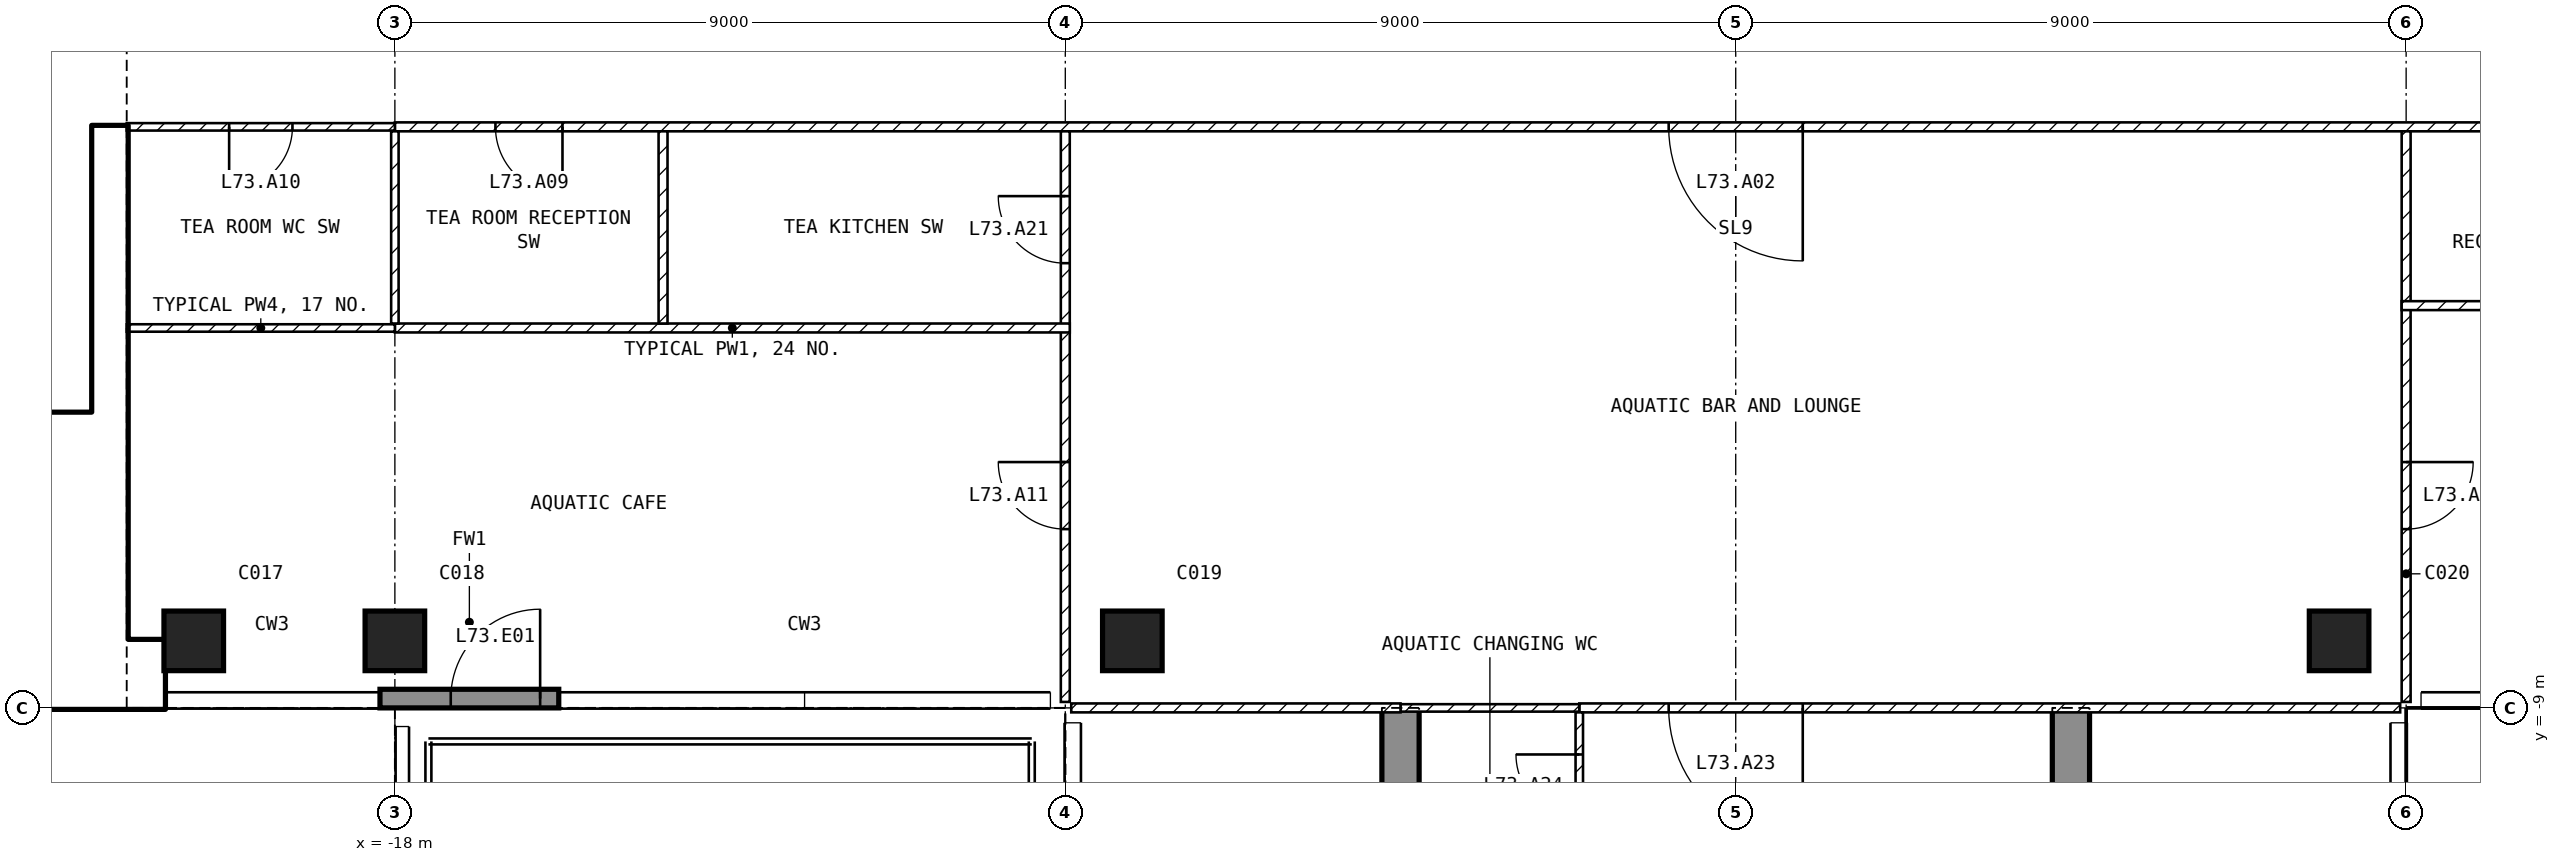
"""IFC4 building model, lengths in metres.
Left out: names, types, materials, properties, quantities, classifications, styles, units other than length and angle.
Written with IfcOpenShell. Run it as: python <this file> out.ifc"""

import sys

from ifc_helpers import new_model, si_unit, direction, frame, frame_2d, origin, origin_2d, place, context, subcontext, project, spatial, polyline, rectangle, outline, extrude, element, fill, save


model = new_model("IFC4")
c1 = context("Model", 3, precision=1e-05, world=origin(), true_north=direction((0.0, 1.0)))
c2 = subcontext(c1, "Body", "Model", "MODEL_VIEW")
j1 = project(units=[si_unit("LENGTHUNIT", "METRE"), si_unit("PLANEANGLEUNIT", "RADIAN")], contexts=[c1])
p1 = place(None, origin())
s1 = spatial("IfcSite", under=j1, at=p1, CompositionType="ELEMENT")
p2 = place(p1, origin())
s2 = spatial("IfcBuilding", under=s1, at=p2, CompositionType="ELEMENT")
p3 = place(p2, frame((0.0, 0.0, 285.0)))
s3 = spatial("IfcBuildingStorey", under=s2, at=p3, CompositionType="ELEMENT", Elevation=285.0)
for number, where, z_axis, x_axis in (
    (1, (-20.7, -8.1, -0.3), (0.0, 0.0, 1.0), (1.0, 0.0, 0.0)),
    (2, (-18.0, -8.1, -0.3), (0.0, 0.0, 1.0), (1.0, 0.0, 0.0)),
    (3, (-8.1, -8.1, -0.3), (0.0, 0.0, 1.0), (1.0, 0.0, 0.0)),
    (4, (8.1, -8.1, -0.3), (0.0, 0.0, 1.0), (1.0, 0.0, 0.0)),
):
    element("IfcColumn", number, at=place(p3, frame(where, z_axis=z_axis, x_axis=x_axis)), inside=s3, PredefinedType="COLUMN", context=c2, shape_type="SweptSolid", body=[
        extrude(rectangle(XDim=0.8, YDim=0.8, at=origin_2d()), origin(), (0.0, 0.0, 1.0), 5.45),
    ])
for number, where, z_axis, x_axis in (
    (5, (-4.75, -16.2, -0.3), (1.0, 0.0, 0.0), (0.0, 1.0, 0.0)),
    (6, (4.25, -16.2, -0.3), (1.0, 0.0, 0.0), (0.0, 1.0, 0.0)),
):
    element("IfcWall", number, at=place(p3, frame(where, z_axis=z_axis, x_axis=x_axis)), inside=s3, PredefinedType="SHEAR", context=c2, shape_type="SweptSolid", body=[
        extrude(outline(polyline([(0.0, 0.0), (2.7, 0.0), (2.7, 2.7), (5.1, 2.7), (5.1, 0.0), (7.2, 0.0), (7.2, 5.45), (0.0, 5.45), (0.0, 0.0)])), origin(), (0.0, 0.0, 1.0), 0.5),
    ])
p4 = place(p3, frame((-18.2, -8.875, 0.0), z_axis=(0.0, 0.0, 1.0), x_axis=(1.0, 0.0, 0.0)))
e7 = element("IfcWall", 7, at=p4, inside=s3, PredefinedType="SOLIDWALL", context=c2, shape_type="SweptSolid", body=[
    extrude(rectangle(XDim=2.4, YDim=0.25, at=frame_2d((1.2, 0.0))), origin(), (0.0, 0.0, 1.0), 5.15),
])
p5 = place(p4, frame((0.95, 0.0, 0.0)))
e8 = element("IfcOpeningElement", 8, at=p5, cuts=e7, PredefinedType="OPENING", context=c2, shape_type="SweptSolid", body=[
    extrude(rectangle(XDim=1.2, YDim=2.4, at=frame_2d((0.6, 1.2))), frame((0.0, 0.135, 0.0), z_axis=(0.0, -1.0, 0.0), x_axis=(1.0, 0.0, 0.0)), (0.0, 0.0, 1.0), 0.27),
])
p6 = place(p3, frame((-30.2, -8.55, 0.0), z_axis=(0.0, 0.0, 1.0), x_axis=(1.0, 0.0, 0.0)))
e9 = element("IfcWall", 9, at=p6, inside=s3, PredefinedType="SHEAR", context=c2, shape_type="SweptSolid", body=[
    extrude(rectangle(XDim=9.1, YDim=0.9, at=frame_2d((4.55, 0.0))), origin(), (0.0, 0.0, 1.0), 5.15),
])
p7 = place(p3, frame((-21.825, -8.1, 0.0), z_axis=(0.0, 0.0, 1.0), x_axis=(0.0, 1.0, 0.0)))
e10 = element("IfcWall", 10, at=p7, inside=s3, PredefinedType="SHEAR", context=c2, shape_type="SweptSolid", body=[
    extrude(rectangle(XDim=6.9, YDim=0.45, at=frame_2d((3.45, 0.0))), origin(), (0.0, 0.0, 1.0), 5.15),
])
p8 = place(p3, frame((-28.35, -5.15, 0.0), z_axis=(0.0, 0.0, 1.0), x_axis=(1.0, 0.0, 0.0)))
e11 = element("IfcWall", 11, at=p8, inside=s3, PredefinedType="SOLIDWALL", context=c2, shape_type="SweptSolid", body=[
    extrude(rectangle(XDim=6.3, YDim=0.2, at=frame_2d((3.15, 0.0))), origin(), (0.0, 0.0, 1.0), 5.15),
])
p9 = place(p8, frame((5.1, 0.0, 0.0)))
e12 = element("IfcOpeningElement", 12, at=p9, cuts=e11, PredefinedType="OPENING", context=c2, shape_type="SweptSolid", body=[
    extrude(rectangle(XDim=1.0, YDim=2.1, at=frame_2d((0.5, 1.05))), frame((0.0, 0.11, 0.0), z_axis=(0.0, -1.0, 0.0), x_axis=(1.0, 0.0, 0.0)), (0.0, 0.0, 1.0), 0.22),
])
p10 = place(p3, frame((14.4, -1.2, 0.0), z_axis=(0.0, 0.0, 1.0), x_axis=(-1.0, 0.0, 0.0)))
e13 = element("IfcWall", 13, at=p10, inside=s3, PredefinedType="PARTITIONING", context=c2, shape_type="SweptSolid", body=[
    extrude(rectangle(XDim=32.4, YDim=0.12, at=frame_2d((16.2, 0.0))), origin(), (0.0, 0.0, 1.0), 5.15),
])
p11 = place(p10, frame((13.5, 0.0, 0.0)))
e14 = element("IfcOpeningElement", 14, at=p11, cuts=e13, PredefinedType="OPENING", context=c2, shape_type="SweptSolid", body=[
    extrude(rectangle(XDim=1.8, YDim=2.1, at=frame_2d((0.9, 1.05))), frame((0.0, 0.07, 0.0), z_axis=(0.0, -1.0, 0.0), x_axis=(1.0, 0.0, 0.0)), (0.0, 0.0, 1.0), 0.14),
])
p12 = place(p10, frame((3.45, 0.0, 0.0)))
e15 = element("IfcOpeningElement", 15, at=p12, cuts=e13, PredefinedType="OPENING", context=c2, shape_type="SweptSolid", body=[
    extrude(rectangle(XDim=0.9, YDim=2.1, at=frame_2d((0.45, 1.05))), frame((0.0, 0.07, 0.0), z_axis=(0.0, -1.0, 0.0), x_axis=(1.0, 0.0, 0.0)), (0.0, 0.0, 1.0), 0.14),
])
p13 = place(p10, frame((30.15, 0.0, 0.0)))
e16 = element("IfcOpeningElement", 16, at=p13, cuts=e13, PredefinedType="OPENING", context=c2, shape_type="SweptSolid", body=[
    extrude(rectangle(XDim=0.9, YDim=2.1, at=frame_2d((0.45, 1.05))), frame((0.0, 0.07, 0.0), z_axis=(0.0, -1.0, 0.0), x_axis=(1.0, 0.0, 0.0)), (0.0, 0.0, 1.0), 0.14),
])
p14 = place(p3, frame((-18.0, -1.2, 0.0), z_axis=(0.0, 0.0, 1.0), x_axis=(-1.0, 0.0, 0.0)))
e17 = element("IfcWall", 17, at=p14, inside=s3, PredefinedType="PARTITIONING", context=c2, shape_type="SweptSolid", body=[
    extrude(rectangle(XDim=3.6, YDim=0.1, at=frame_2d((1.8, 0.0))), origin(), (0.0, 0.0, 1.0), 5.15),
])
p15 = place(p14, frame((1.375, 0.0, 0.0)))
e18 = element("IfcOpeningElement", 18, at=p15, cuts=e17, PredefinedType="OPENING", context=c2, shape_type="SweptSolid", body=[
    extrude(rectangle(XDim=0.85, YDim=2.1, at=frame_2d((0.425, 1.05))), frame((0.0, 0.06, 0.0), z_axis=(0.0, -1.0, 0.0), x_axis=(1.0, 0.0, 0.0)), (0.0, 0.0, 1.0), 0.12),
])
p16 = place(p3, frame((9.0, -1.26, 0.0), z_axis=(0.0, 0.0, 1.0), x_axis=(0.0, -1.0, 0.0)))
e19 = element("IfcWall", 19, at=p16, inside=s3, PredefinedType="PARTITIONING", context=c2, shape_type="SweptSolid", body=[
    extrude(rectangle(XDim=7.66, YDim=0.12, at=frame_2d((3.83, 0.0))), origin(), (0.0, 0.0, 1.0), 5.15),
])
p17 = place(p16, frame((4.44, 0.0, 0.0)))
e20 = element("IfcOpeningElement", 20, at=p17, cuts=e19, PredefinedType="OPENING", context=c2, shape_type="SweptSolid", body=[
    extrude(rectangle(XDim=0.9, YDim=2.1, at=frame_2d((0.45, 1.05))), frame((0.0, 0.07, 0.0), z_axis=(0.0, -1.0, 0.0), x_axis=(1.0, 0.0, 0.0)), (0.0, 0.0, 1.0), 0.14),
])
p18 = place(p3, frame((-9.0, -8.92, 0.0), z_axis=(0.0, 0.0, 1.0), x_axis=(0.0, 1.0, 0.0)))
e21 = element("IfcWall", 21, at=p18, inside=s3, PredefinedType="PARTITIONING", context=c2, shape_type="SweptSolid", body=[
    extrude(rectangle(XDim=7.66, YDim=0.12, at=frame_2d((3.83, 0.0))), origin(), (0.0, 0.0, 1.0), 5.15),
])
p19 = place(p18, frame((2.32, 0.0, 0.0)))
e22 = element("IfcOpeningElement", 22, at=p19, cuts=e21, PredefinedType="OPENING", context=c2, shape_type="SweptSolid", body=[
    extrude(rectangle(XDim=0.9, YDim=2.1, at=frame_2d((0.45, 1.05))), frame((0.0, 0.07, 0.0), z_axis=(0.0, -1.0, 0.0), x_axis=(1.0, 0.0, 0.0)), (0.0, 0.0, 1.0), 0.14),
])
p20 = place(p18, frame((5.89, 0.0, 0.0)))
e23 = element("IfcOpeningElement", 23, at=p20, cuts=e21, PredefinedType="OPENING", context=c2, shape_type="SweptSolid", body=[
    extrude(rectangle(XDim=0.9, YDim=2.1, at=frame_2d((0.45, 1.05))), frame((0.0, 0.07, 0.0), z_axis=(0.0, -1.0, 0.0), x_axis=(1.0, 0.0, 0.0)), (0.0, 0.0, 1.0), 0.14),
])
p21 = place(p3, frame((8.92, -9.0, 0.0), z_axis=(0.0, 0.0, 1.0), x_axis=(-1.0, 0.0, 0.0)))
e24 = element("IfcWall", 24, at=p21, inside=s3, PredefinedType="PARTITIONING", context=c2, shape_type="SweptSolid", body=[
    extrude(rectangle(XDim=11.02, YDim=0.12, at=frame_2d((5.51, 0.0))), origin(), (0.0, 0.0, 1.0), 5.15),
])
p22 = place(p21, frame((8.02, 0.0, 0.0)))
e25 = element("IfcOpeningElement", 25, at=p22, cuts=e24, PredefinedType="OPENING", context=c2, shape_type="SweptSolid", body=[
    extrude(rectangle(XDim=1.8, YDim=2.1, at=frame_2d((0.9, 1.05))), frame((0.0, 0.07, 0.0), z_axis=(0.0, -1.0, 0.0), x_axis=(1.0, 0.0, 0.0)), (0.0, 0.0, 1.0), 0.14),
])
p23 = place(p3, frame((-2.1, -9.0, 0.0), z_axis=(0.0, 0.0, 1.0), x_axis=(-1.0, 0.0, 0.0)))
e26 = element("IfcWall", 26, at=p23, inside=s3, PredefinedType="PARTITIONING", context=c2, shape_type="SweptSolid", body=[
    extrude(rectangle(XDim=2.4, YDim=0.1, at=frame_2d((1.2, 0.0))), origin(), (0.0, 0.0, 1.0), 5.15),
])
p24 = place(p3, frame((-4.5, -9.0, 0.0), z_axis=(0.0, 0.0, 1.0), x_axis=(-1.0, 0.0, 0.0)))
e27 = element("IfcWall", 27, at=p24, inside=s3, PredefinedType="PARTITIONING", context=c2, shape_type="SweptSolid", body=[
    extrude(rectangle(XDim=4.42, YDim=0.12, at=frame_2d((2.21, 0.0))), origin(), (0.0, 0.0, 1.0), 5.15),
])
p25 = place(p3, frame((8.94, -3.6, 0.0), z_axis=(0.0, 0.0, 1.0), x_axis=(1.0, 0.0, 0.0)))
e28 = element("IfcWall", 28, at=p25, inside=s3, PredefinedType="PARTITIONING", context=c2, shape_type="SweptSolid", body=[
    extrude(rectangle(XDim=5.46, YDim=0.12, at=frame_2d((2.73, 0.0))), origin(), (0.0, 0.0, 1.0), 5.15),
])
p26 = place(p3, frame((-18.0, -3.9, 0.0), z_axis=(0.0, 0.0, 1.0), x_axis=(1.0, 0.0, 0.0)))
e29 = element("IfcWall", 29, at=p26, inside=s3, PredefinedType="PARTITIONING", context=c2, shape_type="SweptSolid", body=[
    extrude(rectangle(XDim=9.06, YDim=0.12, at=frame_2d((4.53, 0.0))), origin(), (0.0, 0.0, 1.0), 5.15),
])
p27 = place(p3, frame((-21.6, -3.9, 0.0), z_axis=(0.0, 0.0, 1.0), x_axis=(1.0, 0.0, 0.0)))
e30 = element("IfcWall", 30, at=p27, inside=s3, PredefinedType="PARTITIONING", context=c2, shape_type="SweptSolid", body=[
    extrude(rectangle(XDim=3.6, YDim=0.1, at=frame_2d((1.8, 0.0))), origin(), (0.0, 0.0, 1.0), 5.15),
])
p28 = place(p3, frame((-14.4, -3.84, 0.0), z_axis=(0.0, 0.0, 1.0), x_axis=(0.0, 1.0, 0.0)))
e31 = element("IfcWall", 31, at=p28, inside=s3, PredefinedType="PARTITIONING", context=c2, shape_type="SweptSolid", body=[
    extrude(rectangle(XDim=2.58, YDim=0.12, at=frame_2d((1.29, 0.0))), origin(), (0.0, 0.0, 1.0), 5.15),
])
p29 = place(p3, frame((-18.0, -3.84, 0.0), z_axis=(0.0, 0.0, 1.0), x_axis=(0.0, 1.0, 0.0)))
e32 = element("IfcWall", 32, at=p29, inside=s3, PredefinedType="PARTITIONING", context=c2, shape_type="SweptSolid", body=[
    extrude(rectangle(XDim=2.58, YDim=0.1, at=frame_2d((1.29, 0.0))), origin(), (0.0, 0.0, 1.0), 4.396),
])
p30 = place(p3, frame((-2.1, -11.04, 0.0), z_axis=(0.0, 0.0, 1.0), x_axis=(0.0, 1.0, 0.0)))
e33 = element("IfcWall", 33, at=p30, inside=s3, PredefinedType="PARTITIONING", context=c2, shape_type="SweptSolid", body=[
    extrude(rectangle(XDim=1.98, YDim=0.1, at=frame_2d((0.99, 0.0))), origin(), (0.0, 0.0, 1.0), 5.15),
])
p31 = place(p30, frame((0.565, 0.0, 0.0)))
e34 = element("IfcOpeningElement", 34, at=p31, cuts=e33, PredefinedType="OPENING", context=c2, shape_type="SweptSolid", body=[
    extrude(rectangle(XDim=0.85, YDim=2.1, at=frame_2d((0.425, 1.05))), frame((0.0, 0.06, 0.0), z_axis=(0.0, -1.0, 0.0), x_axis=(1.0, 0.0, 0.0)), (0.0, 0.0, 1.0), 0.12),
])
p32 = place(p5, origin())
e35 = element("IfcDoor", 35, at=p32, inside=s3, OperationType="SINGLE_SWING_RIGHT", PredefinedType="DOOR", context=c2, shape_type="SweptSolid", body=[
    extrude(rectangle(XDim=1.2, YDim=2.4, at=frame_2d((0.6, 1.2))), frame((0.0, 0.025, 0.0), z_axis=(0.0, -1.0, 0.0), x_axis=(1.0, 0.0, 0.0)), (0.0, 0.0, 1.0), 0.05),
])
fill(e8, e35)
p33 = place(p9, origin())
e36 = element("IfcDoor", 36, at=p33, inside=s3, OperationType="SINGLE_SWING_LEFT", PredefinedType="DOOR", context=c2, shape_type="SweptSolid", body=[
    extrude(rectangle(XDim=1.0, YDim=2.1, at=frame_2d((0.5, 1.05))), frame((0.0, 0.025, 0.0), z_axis=(0.0, -1.0, 0.0), x_axis=(1.0, 0.0, 0.0)), (0.0, 0.0, 1.0), 0.05),
])
fill(e12, e36)
p34 = place(p11, origin())
e37 = element("IfcDoor", 37, at=p34, inside=s3, OperationType="SINGLE_SWING_LEFT", PredefinedType="DOOR", context=c2, shape_type="SweptSolid", body=[
    extrude(rectangle(XDim=1.8, YDim=2.1, at=frame_2d((0.9, 1.05))), frame((0.0, 0.025, 0.0), z_axis=(0.0, -1.0, 0.0), x_axis=(1.0, 0.0, 0.0)), (0.0, 0.0, 1.0), 0.05),
])
fill(e14, e37)
p35 = place(p13, origin())
e38 = element("IfcDoor", 38, at=p35, inside=s3, OperationType="SINGLE_SWING_LEFT", PredefinedType="DOOR", context=c2, shape_type="SweptSolid", body=[
    extrude(rectangle(XDim=0.9, YDim=2.1, at=frame_2d((0.45, 1.05))), frame((0.0, 0.025, 0.0), z_axis=(0.0, -1.0, 0.0), x_axis=(1.0, 0.0, 0.0)), (0.0, 0.0, 1.0), 0.05),
])
fill(e16, e38)
p36 = place(p15, origin())
e39 = element("IfcDoor", 39, at=p36, inside=s3, OperationType="SINGLE_SWING_RIGHT", PredefinedType="DOOR", context=c2, shape_type="SweptSolid", body=[
    extrude(rectangle(XDim=0.85, YDim=2.1, at=frame_2d((0.425, 1.05))), frame((0.0, 0.025, 0.0), z_axis=(0.0, -1.0, 0.0), x_axis=(1.0, 0.0, 0.0)), (0.0, 0.0, 1.0), 0.05),
])
fill(e18, e39)
p37 = place(p19, origin())
e40 = element("IfcDoor", 40, at=p37, inside=s3, OperationType="SINGLE_SWING_RIGHT", PredefinedType="DOOR", context=c2, shape_type="SweptSolid", body=[
    extrude(rectangle(XDim=0.9, YDim=2.1, at=frame_2d((0.45, 1.05))), frame((0.0, 0.025, 0.0), z_axis=(0.0, -1.0, 0.0), x_axis=(1.0, 0.0, 0.0)), (0.0, 0.0, 1.0), 0.05),
])
fill(e22, e40)
p38 = place(p17, origin())
e41 = element("IfcDoor", 41, at=p38, inside=s3, OperationType="SINGLE_SWING_LEFT", PredefinedType="DOOR", context=c2, shape_type="SweptSolid", body=[
    extrude(rectangle(XDim=0.9, YDim=2.1, at=frame_2d((0.45, 1.05))), frame((0.0, 0.025, 0.0), z_axis=(0.0, -1.0, 0.0), x_axis=(1.0, 0.0, 0.0)), (0.0, 0.0, 1.0), 0.05),
])
fill(e20, e41)
p39 = place(p20, origin())
e42 = element("IfcDoor", 42, at=p39, inside=s3, OperationType="SINGLE_SWING_RIGHT", PredefinedType="DOOR", context=c2, shape_type="SweptSolid", body=[
    extrude(rectangle(XDim=0.9, YDim=2.1, at=frame_2d((0.45, 1.05))), frame((0.0, 0.025, 0.0), z_axis=(0.0, -1.0, 0.0), x_axis=(1.0, 0.0, 0.0)), (0.0, 0.0, 1.0), 0.05),
])
fill(e23, e42)
p40 = place(p22, origin())
e43 = element("IfcDoor", 43, at=p40, inside=s3, OperationType="SINGLE_SWING_LEFT", PredefinedType="DOOR", context=c2, shape_type="SweptSolid", body=[
    extrude(rectangle(XDim=1.8, YDim=2.1, at=frame_2d((0.9, 1.05))), frame((0.0, 0.025, 0.0), z_axis=(0.0, -1.0, 0.0), x_axis=(1.0, 0.0, 0.0)), (0.0, 0.0, 1.0), 0.05),
])
fill(e25, e43)
p41 = place(p31, origin())
e44 = element("IfcDoor", 44, at=p41, inside=s3, OperationType="SINGLE_SWING_RIGHT", PredefinedType="DOOR", context=c2, shape_type="SweptSolid", body=[
    extrude(rectangle(XDim=0.85, YDim=2.1, at=frame_2d((0.425, 1.05))), frame((0.0, 0.025, 0.0), z_axis=(0.0, -1.0, 0.0), x_axis=(1.0, 0.0, 0.0)), (0.0, 0.0, 1.0), 0.05),
])
fill(e34, e44)
save(model, sys.argv[1])
